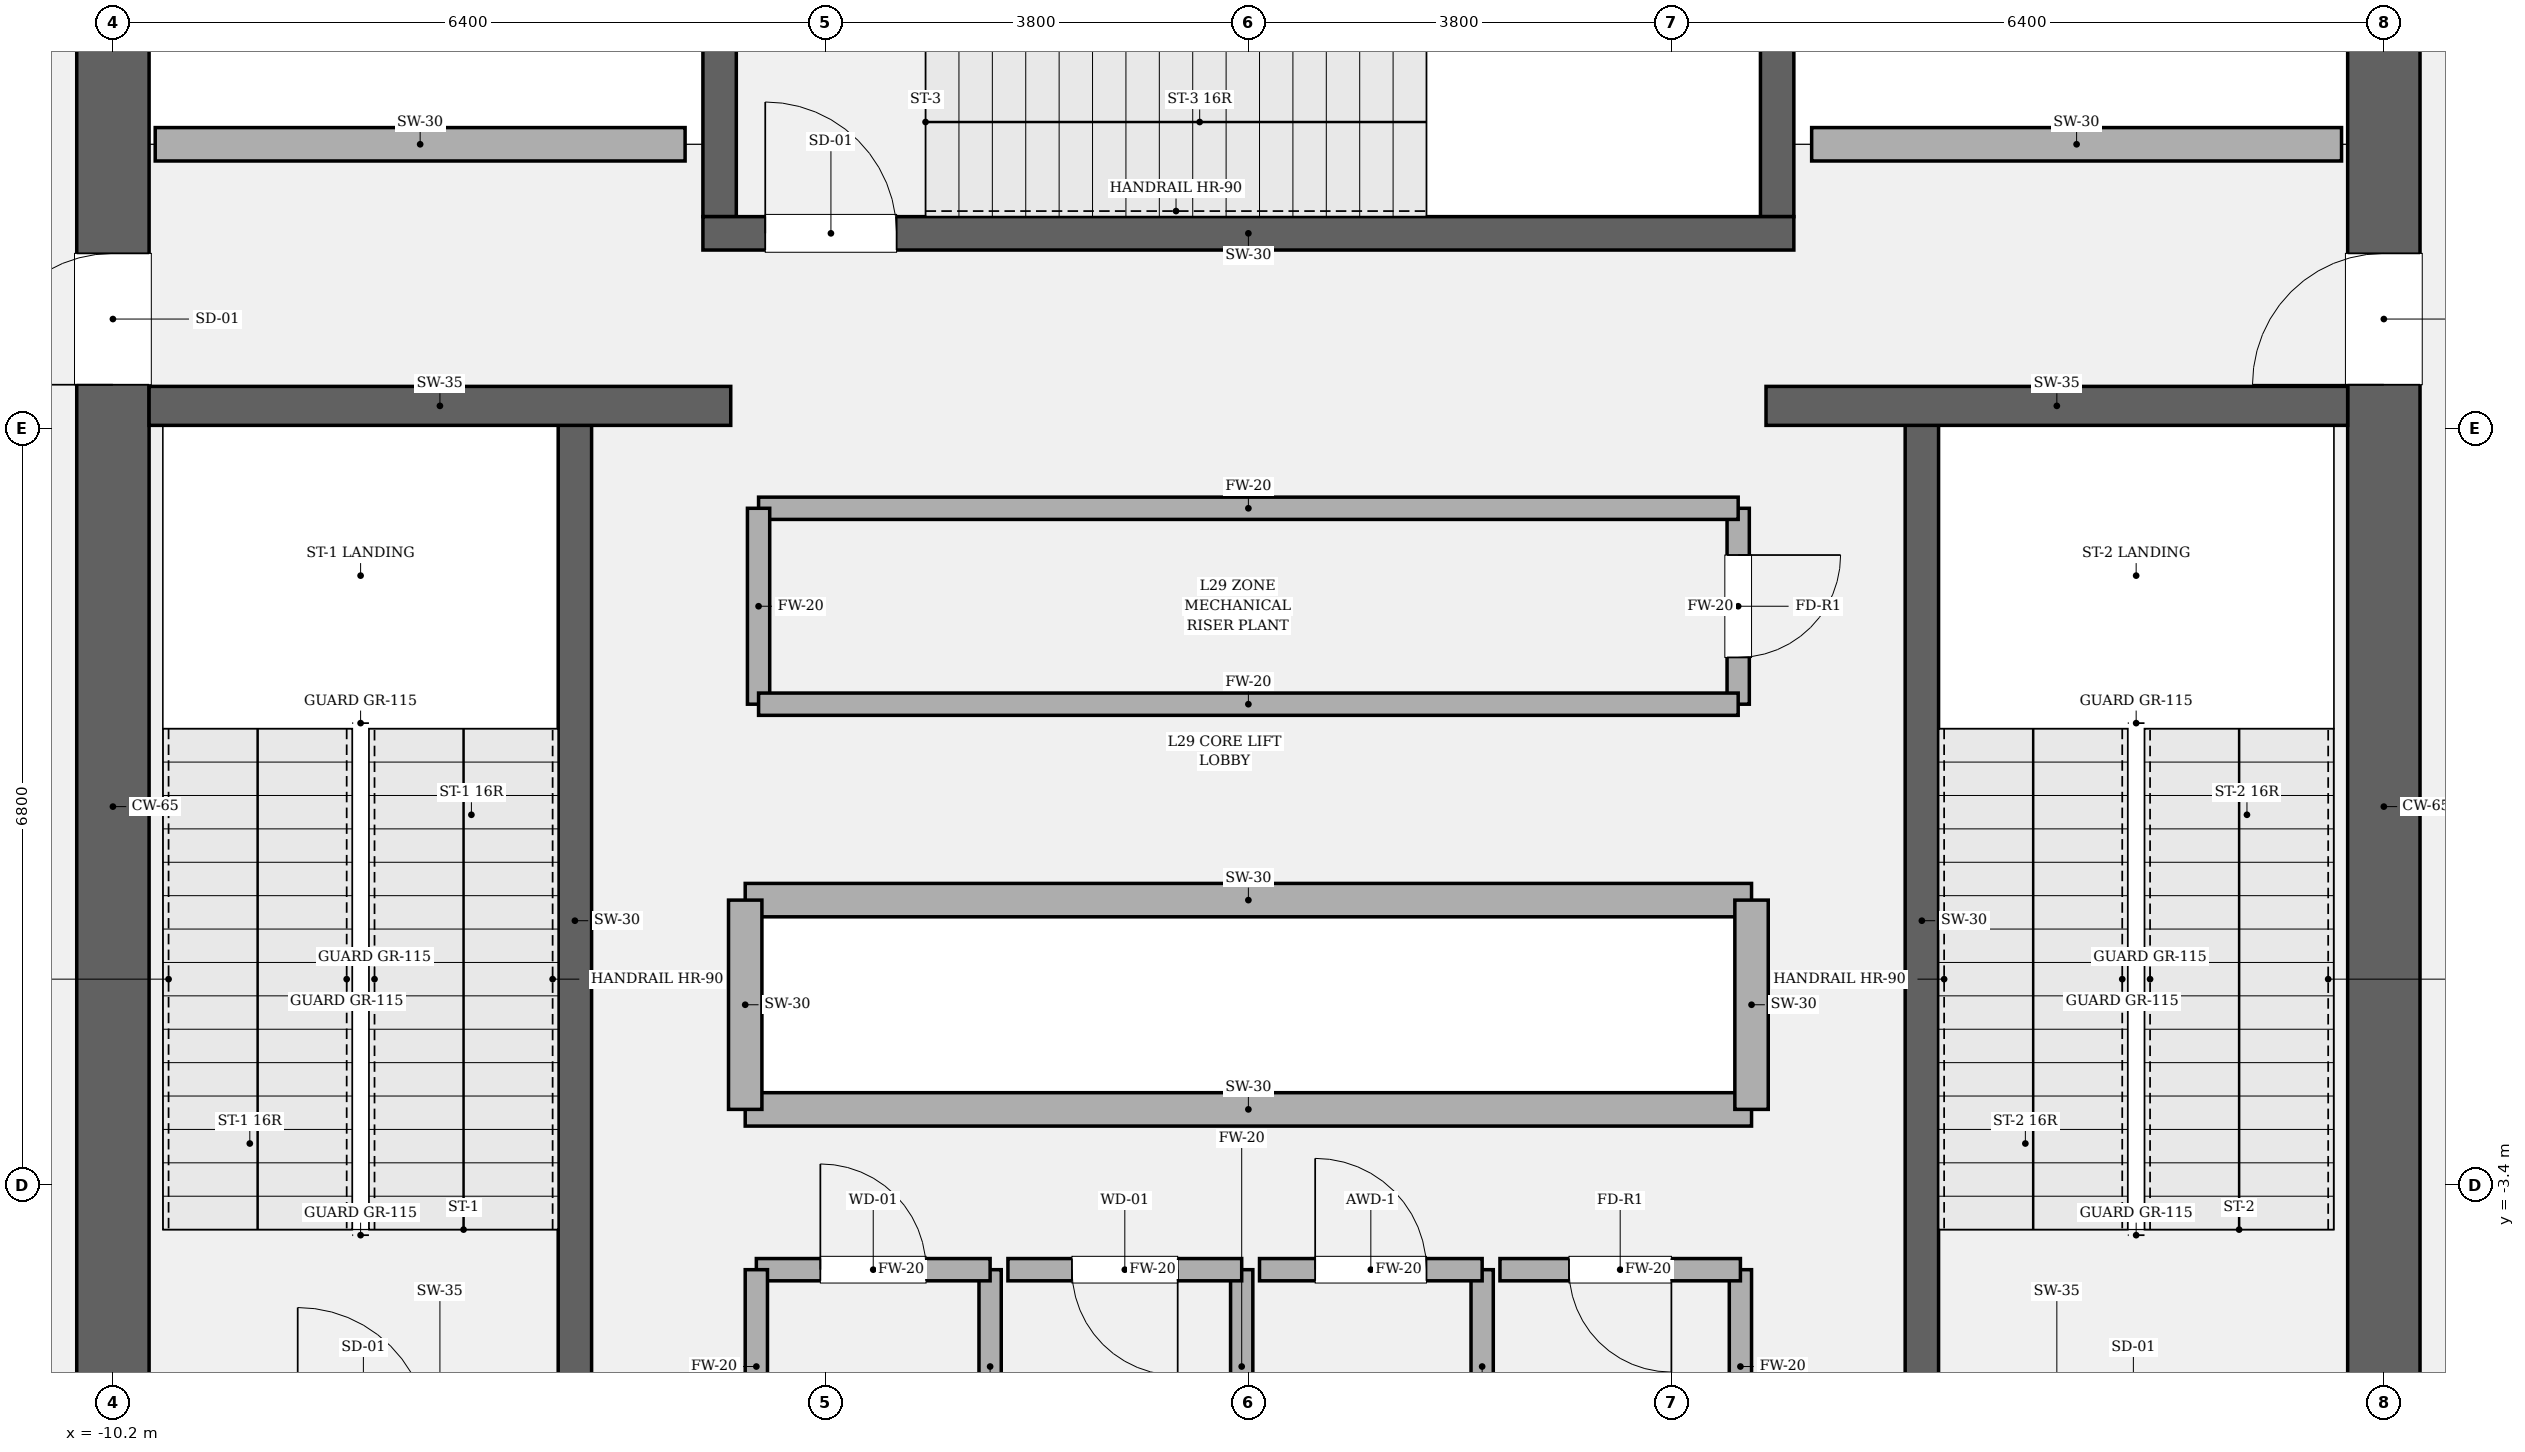
"""IFC4 building model, lengths in metres.
Left out: names, types, materials, properties, quantities, classifications, styles, units other than length and angle.
Written with IfcOpenShell. Run it as: python <this file> out.ifc"""

import sys

from ifc_helpers import new_model, si_unit, direction, frame, frame_2d, origin, place, context, subcontext, project, spatial, rectangle, extrude, element, fill, save


model = new_model("IFC4")
c1 = context("Model", 3, precision=1e-05, world=origin(), true_north=direction((0.0, 1.0)))
c2 = subcontext(c1, "Body", "Model", "MODEL_VIEW")
j1 = project(units=[si_unit("LENGTHUNIT", "METRE"), si_unit("PLANEANGLEUNIT", "RADIAN")], contexts=[c1])
p1 = place(None, origin())
s1 = spatial("IfcSite", under=j1, at=p1, CompositionType="ELEMENT")
p2 = place(p1, origin())
s2 = spatial("IfcBuilding", under=s1, at=p2, CompositionType="ELEMENT")
p3 = place(p2, frame((0.0, 0.0, 125.4)))
s3 = spatial("IfcBuildingStorey", under=s2, at=p3, CompositionType="ELEMENT", Elevation=125.4)
p4 = place(p3, frame((-10.2, -8.875, 0.0), z_axis=(0.0, 0.0, 1.0), x_axis=(0.0, 1.0, 0.0)))
e1 = element("IfcWall", 1, at=p4, inside=s3, PredefinedType="SHEAR", context=c2, shape_type="SweptSolid", body=[
    extrude(rectangle(XDim=17.75, YDim=0.65, at=frame_2d((8.875, 0.0))), origin(), (0.0, 0.0, 1.0), 4.8),
])
p5 = place(p4, frame((12.665, 0.0, 0.0)))
e2 = element("IfcOpeningElement", 2, at=p5, cuts=e1, PredefinedType="OPENING", context=c2, shape_type="SweptSolid", body=[
    extrude(rectangle(XDim=1.18, YDim=2.2, at=frame_2d((0.59, 1.1))), frame((0.0, 0.335, 0.0), z_axis=(0.0, -1.0, 0.0), x_axis=(1.0, 0.0, 0.0)), (0.0, 0.0, 1.0), 0.67),
])
p6 = place(p3, frame((10.2, 8.875, 0.0), z_axis=(0.0, 0.0, 1.0), x_axis=(0.0, -1.0, 0.0)))
e3 = element("IfcWall", 3, at=p6, inside=s3, PredefinedType="SHEAR", context=c2, shape_type="SweptSolid", body=[
    extrude(rectangle(XDim=17.75, YDim=0.65, at=frame_2d((8.875, 0.0))), origin(), (0.0, 0.0, 1.0), 4.8),
])
p7 = place(p6, frame((3.905, 0.0, 0.0)))
e4 = element("IfcOpeningElement", 4, at=p7, cuts=e3, PredefinedType="OPENING", context=c2, shape_type="SweptSolid", body=[
    extrude(rectangle(XDim=1.18, YDim=2.2, at=frame_2d((0.59, 1.1))), frame((0.0, 0.335, 0.0), z_axis=(0.0, -1.0, 0.0), x_axis=(1.0, 0.0, 0.0)), (0.0, 0.0, 1.0), 0.67),
])
for number, where, z_axis, x_axis in (
    (5, (-6.05, -5.5, 0.0), (0.0, 0.0, 1.0), (0.0, 1.0, 0.0)),
    (6, (6.05, 3.45, 0.0), (0.0, 0.0, 1.0), (0.0, -1.0, 0.0)),
):
    element("IfcWall", number, at=place(p3, frame(where, z_axis=z_axis, x_axis=x_axis)), inside=s3, PredefinedType="SOLIDWALL", context=c2, shape_type="SweptSolid", body=[
        extrude(rectangle(XDim=8.95, YDim=0.3, at=frame_2d((4.475, 0.0))), origin(), (0.0, 0.0, 1.0), 4.8),
    ])
for number, where, z_axis, x_axis in (
    (7, (-4.75, 5.3, 0.0), (0.0, 0.0, 1.0), (0.0, 1.0, 0.0)),
    (8, (4.75, 8.875, 0.0), (0.0, 0.0, 1.0), (0.0, -1.0, 0.0)),
):
    element("IfcWall", number, at=place(p3, frame(where, z_axis=z_axis, x_axis=x_axis)), inside=s3, PredefinedType="SOLIDWALL", context=c2, shape_type="SweptSolid", body=[
        extrude(rectangle(XDim=3.575, YDim=0.3, at=frame_2d((1.788, 0.0))), origin(), (0.0, 0.0, 1.0), 4.8),
    ])
p8 = place(p3, frame((-4.9, 5.15, 0.0), z_axis=(0.0, 0.0, 1.0), x_axis=(1.0, 0.0, 0.0)))
e9 = element("IfcWall", 9, at=p8, inside=s3, PredefinedType="SOLIDWALL", context=c2, shape_type="SweptSolid", body=[
    extrude(rectangle(XDim=9.8, YDim=0.3, at=frame_2d((4.9, 0.0))), origin(), (0.0, 0.0, 1.0), 4.8),
])
p9 = place(p8, frame((0.56, 0.0, 0.0)))
e10 = element("IfcOpeningElement", 10, at=p9, cuts=e9, PredefinedType="OPENING", context=c2, shape_type="SweptSolid", body=[
    extrude(rectangle(XDim=1.18, YDim=2.2, at=frame_2d((0.59, 1.1))), frame((0.0, 0.16, 0.0), z_axis=(0.0, -1.0, 0.0), x_axis=(1.0, 0.0, 0.0)), (0.0, 0.0, 1.0), 0.32),
])
for number, where, z_axis, x_axis in (
    (11, (-9.875, 3.6, 0.0), (0.0, 0.0, 1.0), (1.0, 0.0, 0.0)),
    (12, (4.65, 3.6, 0.0), (0.0, 0.0, 1.0), (1.0, 0.0, 0.0)),
):
    element("IfcWall", number, at=place(p3, frame(where, z_axis=z_axis, x_axis=x_axis)), inside=s3, PredefinedType="SOLIDWALL", context=c2, shape_type="SweptSolid", body=[
        extrude(rectangle(XDim=5.225, YDim=0.35, at=frame_2d((2.613, 0.0))), origin(), (0.0, 0.0, 1.0), 4.8),
    ])
for number, where, z_axis, x_axis in (
    (13, (-4.52, -0.84, 0.0), (0.0, 0.0, 1.0), (1.0, 0.0, 0.0)),
    (14, (-4.52, -2.72, 0.0), (0.0, 0.0, 1.0), (1.0, 0.0, 0.0)),
):
    element("IfcWall", number, at=place(p3, frame(where, z_axis=z_axis, x_axis=x_axis)), inside=s3, PredefinedType="SOLIDWALL", context=c2, shape_type="SweptSolid", body=[
        extrude(rectangle(XDim=9.04, YDim=0.3, at=frame_2d((4.52, 0.0))), origin(), (0.0, 0.0, 1.0), 4.48),
    ])
for number, where, z_axis, x_axis in (
    (15, (-4.52, -2.72, 0.0), (0.0, 0.0, 1.0), (0.0, 1.0, 0.0)),
    (16, (4.52, -2.72, 0.0), (0.0, 0.0, 1.0), (0.0, 1.0, 0.0)),
):
    element("IfcWall", number, at=place(p3, frame(where, z_axis=z_axis, x_axis=x_axis)), inside=s3, PredefinedType="SOLIDWALL", context=c2, shape_type="SweptSolid", body=[
        extrude(rectangle(XDim=1.88, YDim=0.3, at=frame_2d((0.94, 0.0))), origin(), (0.0, 0.0, 1.0), 4.48),
    ])
for number, where, z_axis, x_axis in (
    (17, (-9.82, 5.95, 0.0), (0.0, 0.0, 1.0), (1.0, 0.0, 0.0)),
    (18, (5.06, 5.95, 0.0), (0.0, 0.0, 1.0), (1.0, 0.0, 0.0)),
):
    element("IfcWall", number, at=place(p3, frame(where, z_axis=z_axis, x_axis=x_axis)), inside=s3, PredefinedType="SOLIDWALL", context=c2, shape_type="SweptSolid", body=[
        extrude(rectangle(XDim=4.76, YDim=0.3, at=frame_2d((2.38, 0.0))), origin(), (0.0, 0.0, 1.0), 4.48),
    ])
p10 = place(p3, frame((-2.32, -5.9, 0.0), z_axis=(0.0, 0.0, 1.0), x_axis=(0.0, 1.0, 0.0)))
e19 = element("IfcWall", 19, at=p10, inside=s3, PredefinedType="SOLIDWALL", context=c2, shape_type="SweptSolid", body=[
    extrude(rectangle(XDim=1.74, YDim=0.2, at=frame_2d((0.87, 0.0))), origin(), (0.0, 0.0, 1.0), 4.48),
])
p11 = place(p3, frame((-2.32, -4.16, 0.0), z_axis=(0.0, 0.0, 1.0), x_axis=(-1.0, 0.0, 0.0)))
e20 = element("IfcWall", 20, at=p11, inside=s3, PredefinedType="SOLIDWALL", context=c2, shape_type="SweptSolid", body=[
    extrude(rectangle(XDim=2.1, YDim=0.2, at=frame_2d((1.05, 0.0))), origin(), (0.0, 0.0, 1.0), 4.48),
])
p12 = place(p11, frame((0.575, 0.0, 0.0)))
e21 = element("IfcOpeningElement", 21, at=p12, cuts=e20, PredefinedType="OPENING", context=c2, shape_type="SweptSolid", body=[
    extrude(rectangle(XDim=0.95, YDim=2.15, at=frame_2d((0.475, 1.075))), frame((0.0, 0.11, 0.0), z_axis=(0.0, -1.0, 0.0), x_axis=(1.0, 0.0, 0.0)), (0.0, 0.0, 1.0), 0.22),
])
for number, where, z_axis, x_axis in (
    (22, (-4.42, -4.16, 0.0), (0.0, 0.0, 1.0), (0.0, -1.0, 0.0)),
    (23, (-0.06, -5.9, 0.0), (0.0, 0.0, 1.0), (0.0, 1.0, 0.0)),
):
    element("IfcWall", number, at=place(p3, frame(where, z_axis=z_axis, x_axis=x_axis)), inside=s3, PredefinedType="SOLIDWALL", context=c2, shape_type="SweptSolid", body=[
        extrude(rectangle(XDim=1.74, YDim=0.2, at=frame_2d((0.87, 0.0))), origin(), (0.0, 0.0, 1.0), 4.48),
    ])
p13 = place(p3, frame((-0.06, -4.16, 0.0), z_axis=(0.0, 0.0, 1.0), x_axis=(-1.0, 0.0, 0.0)))
e24 = element("IfcWall", 24, at=p13, inside=s3, PredefinedType="SOLIDWALL", context=c2, shape_type="SweptSolid", body=[
    extrude(rectangle(XDim=2.1, YDim=0.2, at=frame_2d((1.05, 0.0))), origin(), (0.0, 0.0, 1.0), 4.48),
])
p14 = place(p13, frame((0.575, 0.0, 0.0)))
e25 = element("IfcOpeningElement", 25, at=p14, cuts=e24, PredefinedType="OPENING", context=c2, shape_type="SweptSolid", body=[
    extrude(rectangle(XDim=0.95, YDim=2.15, at=frame_2d((0.475, 1.075))), frame((0.0, 0.11, 0.0), z_axis=(0.0, -1.0, 0.0), x_axis=(1.0, 0.0, 0.0)), (0.0, 0.0, 1.0), 0.22),
])
p15 = place(p3, frame((2.1, -5.9, 0.0), z_axis=(0.0, 0.0, 1.0), x_axis=(0.0, 1.0, 0.0)))
e26 = element("IfcWall", 26, at=p15, inside=s3, PredefinedType="SOLIDWALL", context=c2, shape_type="SweptSolid", body=[
    extrude(rectangle(XDim=1.74, YDim=0.2, at=frame_2d((0.87, 0.0))), origin(), (0.0, 0.0, 1.0), 4.48),
])
p16 = place(p3, frame((2.1, -4.16, 0.0), z_axis=(0.0, 0.0, 1.0), x_axis=(-1.0, 0.0, 0.0)))
e27 = element("IfcWall", 27, at=p16, inside=s3, PredefinedType="SOLIDWALL", context=c2, shape_type="SweptSolid", body=[
    extrude(rectangle(XDim=2.0, YDim=0.2, at=frame_2d((1.0, 0.0))), origin(), (0.0, 0.0, 1.0), 4.48),
])
p17 = place(p16, frame((0.5, 0.0, 0.0)))
e28 = element("IfcOpeningElement", 28, at=p17, cuts=e27, PredefinedType="OPENING", context=c2, shape_type="SweptSolid", body=[
    extrude(rectangle(XDim=1.0, YDim=2.15, at=frame_2d((0.5, 1.075))), frame((0.0, 0.11, 0.0), z_axis=(0.0, -1.0, 0.0), x_axis=(1.0, 0.0, 0.0)), (0.0, 0.0, 1.0), 0.22),
])
p18 = place(p3, frame((4.42, -5.9, 0.0), z_axis=(0.0, 0.0, 1.0), x_axis=(0.0, 1.0, 0.0)))
e29 = element("IfcWall", 29, at=p18, inside=s3, PredefinedType="SOLIDWALL", context=c2, shape_type="SweptSolid", body=[
    extrude(rectangle(XDim=1.74, YDim=0.2, at=frame_2d((0.87, 0.0))), origin(), (0.0, 0.0, 1.0), 4.48),
])
p19 = place(p3, frame((4.42, -4.16, 0.0), z_axis=(0.0, 0.0, 1.0), x_axis=(-1.0, 0.0, 0.0)))
e30 = element("IfcWall", 30, at=p19, inside=s3, PredefinedType="SOLIDWALL", context=c2, shape_type="SweptSolid", body=[
    extrude(rectangle(XDim=2.16, YDim=0.2, at=frame_2d((1.08, 0.0))), origin(), (0.0, 0.0, 1.0), 4.48),
])
p20 = place(p19, frame((0.62, 0.0, 0.0)))
e31 = element("IfcOpeningElement", 31, at=p20, cuts=e30, PredefinedType="OPENING", context=c2, shape_type="SweptSolid", body=[
    extrude(rectangle(XDim=0.92, YDim=2.1, at=frame_2d((0.46, 1.05))), frame((0.0, 0.11, 0.0), z_axis=(0.0, -1.0, 0.0), x_axis=(1.0, 0.0, 0.0)), (0.0, 0.0, 1.0), 0.22),
])
p21 = place(p3, frame((4.4, 0.92, 0.0), z_axis=(0.0, 0.0, 1.0), x_axis=(0.0, 1.0, 0.0)))
e32 = element("IfcWall", 32, at=p21, inside=s3, PredefinedType="SOLIDWALL", context=c2, shape_type="SweptSolid", body=[
    extrude(rectangle(XDim=1.76, YDim=0.2, at=frame_2d((0.88, 0.0))), origin(), (0.0, 0.0, 1.0), 4.48),
])
p22 = place(p21, frame((0.42, 0.0, 0.0)))
e33 = element("IfcOpeningElement", 33, at=p22, cuts=e32, PredefinedType="OPENING", context=c2, shape_type="SweptSolid", body=[
    extrude(rectangle(XDim=0.92, YDim=2.1, at=frame_2d((0.46, 1.05))), frame((0.0, 0.11, 0.0), z_axis=(0.0, -1.0, 0.0), x_axis=(1.0, 0.0, 0.0)), (0.0, 0.0, 1.0), 0.22),
])
p23 = place(p3, frame((4.4, 2.68, 0.0), z_axis=(0.0, 0.0, 1.0), x_axis=(-1.0, 0.0, 0.0)))
e34 = element("IfcWall", 34, at=p23, inside=s3, PredefinedType="SOLIDWALL", context=c2, shape_type="SweptSolid", body=[
    extrude(rectangle(XDim=8.8, YDim=0.2, at=frame_2d((4.4, 0.0))), origin(), (0.0, 0.0, 1.0), 4.48),
])
p24 = place(p3, frame((-4.4, 2.68, 0.0), z_axis=(0.0, 0.0, 1.0), x_axis=(0.0, -1.0, 0.0)))
e35 = element("IfcWall", 35, at=p24, inside=s3, PredefinedType="SOLIDWALL", context=c2, shape_type="SweptSolid", body=[
    extrude(rectangle(XDim=1.76, YDim=0.2, at=frame_2d((0.88, 0.0))), origin(), (0.0, 0.0, 1.0), 4.48),
])
p25 = place(p3, frame((-4.4, 0.92, 0.0), z_axis=(0.0, 0.0, 1.0), x_axis=(1.0, 0.0, 0.0)))
e36 = element("IfcWall", 36, at=p25, inside=s3, PredefinedType="SOLIDWALL", context=c2, shape_type="SweptSolid", body=[
    extrude(rectangle(XDim=8.8, YDim=0.2, at=frame_2d((4.4, 0.0))), origin(), (0.0, 0.0, 1.0), 4.48),
])
p26 = place(p9, origin())
e37 = element("IfcDoor", 37, at=p26, inside=s3, OperationType="SINGLE_SWING_LEFT", PredefinedType="DOOR", context=c2, shape_type="SweptSolid", body=[
    extrude(rectangle(XDim=1.18, YDim=2.2, at=frame_2d((0.59, 1.1))), frame((0.0, 0.025, 0.0), z_axis=(0.0, -1.0, 0.0), x_axis=(1.0, 0.0, 0.0)), (0.0, 0.0, 1.0), 0.05),
])
fill(e10, e37)
p27 = place(p5, origin())
e38 = element("IfcDoor", 38, at=p27, inside=s3, OperationType="SINGLE_SWING_LEFT", PredefinedType="DOOR", context=c2, shape_type="SweptSolid", body=[
    extrude(rectangle(XDim=1.18, YDim=2.2, at=frame_2d((0.59, 1.1))), frame((0.0, 0.025, 0.0), z_axis=(0.0, -1.0, 0.0), x_axis=(1.0, 0.0, 0.0)), (0.0, 0.0, 1.0), 0.05),
])
fill(e2, e38)
p28 = place(p7, origin())
e39 = element("IfcDoor", 39, at=p28, inside=s3, OperationType="SINGLE_SWING_RIGHT", PredefinedType="DOOR", context=c2, shape_type="SweptSolid", body=[
    extrude(rectangle(XDim=1.18, YDim=2.2, at=frame_2d((0.59, 1.1))), frame((0.0, 0.025, 0.0), z_axis=(0.0, -1.0, 0.0), x_axis=(1.0, 0.0, 0.0)), (0.0, 0.0, 1.0), 0.05),
])
fill(e4, e39)
p29 = place(p12, origin())
e40 = element("IfcDoor", 40, at=p29, inside=s3, OperationType="SINGLE_SWING_RIGHT", PredefinedType="DOOR", context=c2, shape_type="SweptSolid", body=[
    extrude(rectangle(XDim=0.95, YDim=2.15, at=frame_2d((0.475, 1.075))), frame((0.0, 0.025, 0.0), z_axis=(0.0, -1.0, 0.0), x_axis=(1.0, 0.0, 0.0)), (0.0, 0.0, 1.0), 0.05),
])
fill(e21, e40)
p30 = place(p14, origin())
e41 = element("IfcDoor", 41, at=p30, inside=s3, OperationType="SINGLE_SWING_LEFT", PredefinedType="DOOR", context=c2, shape_type="SweptSolid", body=[
    extrude(rectangle(XDim=0.95, YDim=2.15, at=frame_2d((0.475, 1.075))), frame((0.0, 0.025, 0.0), z_axis=(0.0, -1.0, 0.0), x_axis=(1.0, 0.0, 0.0)), (0.0, 0.0, 1.0), 0.05),
])
fill(e25, e41)
p31 = place(p17, origin())
e42 = element("IfcDoor", 42, at=p31, inside=s3, OperationType="SINGLE_SWING_RIGHT", PredefinedType="DOOR", context=c2, shape_type="SweptSolid", body=[
    extrude(rectangle(XDim=1.0, YDim=2.15, at=frame_2d((0.5, 1.075))), frame((0.0, 0.025, 0.0), z_axis=(0.0, -1.0, 0.0), x_axis=(1.0, 0.0, 0.0)), (0.0, 0.0, 1.0), 0.05),
])
fill(e28, e42)
p32 = place(p20, origin())
e43 = element("IfcDoor", 43, at=p32, inside=s3, OperationType="SINGLE_SWING_LEFT", PredefinedType="DOOR", context=c2, shape_type="SweptSolid", body=[
    extrude(rectangle(XDim=0.92, YDim=2.1, at=frame_2d((0.46, 1.05))), frame((0.0, 0.025, 0.0), z_axis=(0.0, -1.0, 0.0), x_axis=(1.0, 0.0, 0.0)), (0.0, 0.0, 1.0), 0.05),
])
fill(e31, e43)
p33 = place(p22, origin())
e44 = element("IfcDoor", 44, at=p33, inside=s3, OperationType="SINGLE_SWING_RIGHT", PredefinedType="DOOR", context=c2, shape_type="SweptSolid", body=[
    extrude(rectangle(XDim=0.92, YDim=2.1, at=frame_2d((0.46, 1.05))), frame((0.0, 0.025, 0.0), z_axis=(0.0, -1.0, 0.0), x_axis=(1.0, 0.0, 0.0)), (0.0, 0.0, 1.0), 0.05),
])
fill(e33, e44)
save(model, sys.argv[1])
